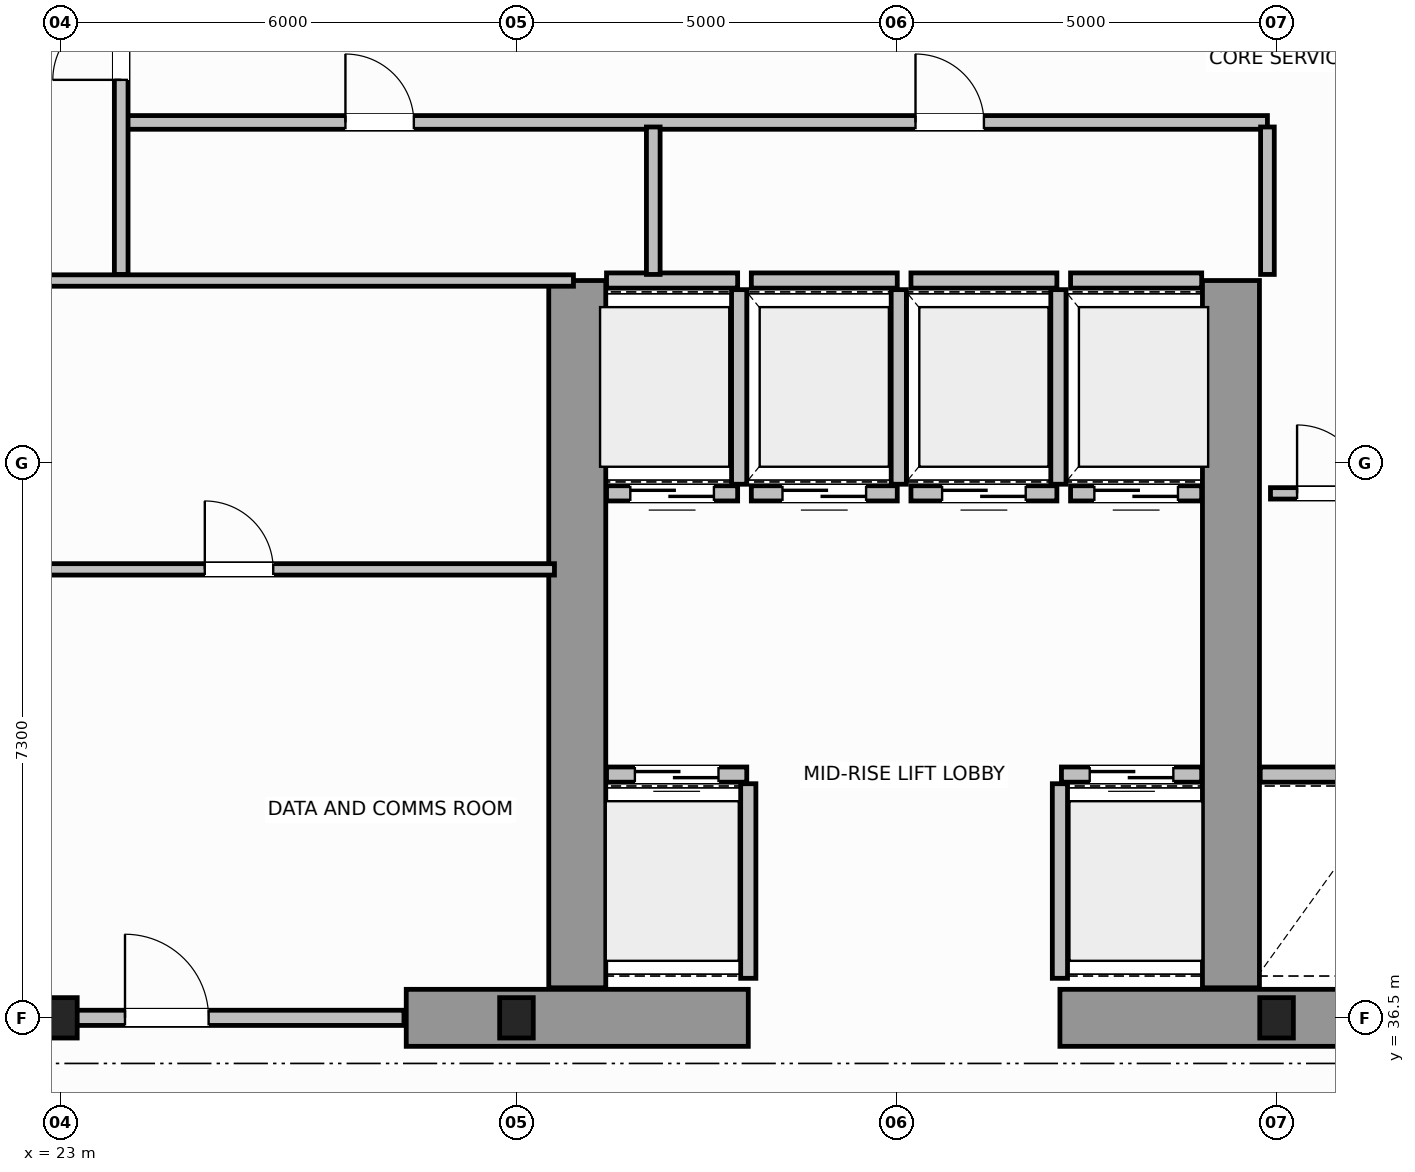
"""IFC4 building model, lengths in metres.
Left out: names, types, materials, properties, quantities, classifications, styles, units other than length and angle.
Written with IfcOpenShell. Run it as: python <this file> out.ifc"""

import sys

from ifc_helpers import new_model, si_unit, direction, frame, frame_2d, origin, origin_2d, place, context, subcontext, project, spatial, rectangle, i_section, extrude, source, transform, mapped, element, fill, save


model = new_model("IFC4")
c1 = context("Model", 3, precision=1e-05, world=origin(), true_north=direction((0.0, 1.0)))
c2 = subcontext(c1, "Body", "Model", "MODEL_VIEW")
j1 = project(units=[si_unit("LENGTHUNIT", "METRE"), si_unit("PLANEANGLEUNIT", "RADIAN")], contexts=[c1])
p1 = place(None, origin())
s1 = spatial("IfcSite", under=j1, at=p1, CompositionType="ELEMENT")
p2 = place(p1, origin())
s2 = spatial("IfcBuilding", under=s1, at=p2, CompositionType="ELEMENT")
p3 = place(p2, frame((0.0, 0.0, 107.2)))
s3 = spatial("IfcBuildingStorey", under=s2, at=p3, CompositionType="ELEMENT", Elevation=107.2)
m1 = source(origin(), c2, "Body", "SweptSolid", [
    extrude(i_section(OverallWidth=0.442, OverallDepth=0.531, WebThickness=0.065, FlangeThickness=0.076, FilletRadius=0.015, at=origin_2d()), origin(), (0.0, 0.0, 1.0), 3.8),
])
for number, where, z_axis, x_axis in (
    (1, (23.0, 36.5, 0.0), (0.0, 0.0, 1.0), (1.0, 0.0, 0.0)),
    (2, (29.0, 36.5, 0.0), (0.0, 0.0, 1.0), (1.0, 0.0, 0.0)),
    (3, (39.0, 36.5, 0.0), (0.0, 0.0, 1.0), (1.0, 0.0, 0.0)),
):
    element("IfcColumn", number, at=place(p3, frame(where, z_axis=z_axis, x_axis=x_axis)), inside=s3, PredefinedType="COLUMN", context=c2, shape_type="MappedRepresentation", body=[
        mapped(m1, transform((0.0, 0.0, 0.0), scale=1.0)),
    ])
for number, where, z_axis, x_axis in (
    (4, (27.55, 36.5, 0.0), (0.0, 0.0, 1.0), (1.0, 0.0, 0.0)),
    (5, (36.15, 36.5, 0.0), (0.0, 0.0, 1.0), (1.0, 0.0, 0.0)),
):
    element("IfcWall", number, at=place(p3, frame(where, z_axis=z_axis, x_axis=x_axis)), inside=s3, PredefinedType="SHEAR", context=c2, shape_type="SweptSolid", body=[
        extrude(rectangle(XDim=4.5, YDim=0.75, at=frame_2d((2.25, 0.0))), origin(), (0.0, 0.0, 1.0), 3.8),
    ])
for number, where, z_axis, x_axis in (
    (6, (29.8, 36.895, 0.0), (0.0, 0.0, 1.0), (0.0, 1.0, 0.0)),
    (7, (38.4, 36.895, 0.0), (0.0, 0.0, 1.0), (0.0, 1.0, 0.0)),
):
    element("IfcWall", number, at=place(p3, frame(where, z_axis=z_axis, x_axis=x_axis)), inside=s3, PredefinedType="SHEAR", context=c2, shape_type="SweptSolid", body=[
        extrude(rectangle(XDim=9.305, YDim=0.75, at=frame_2d((4.652, 0.0))), origin(), (0.0, 0.0, 1.0), 3.8),
    ])
p4 = place(p3, frame((30.185, 39.7, 0.0), z_axis=(0.0, 0.0, 1.0), x_axis=(1.0, 0.0, 0.0)))
e8 = element("IfcWall", 8, at=p4, inside=s3, PredefinedType="SOLIDWALL", context=c2, shape_type="SweptSolid", body=[
    extrude(rectangle(XDim=1.845, YDim=0.2, at=frame_2d((0.922, 0.0))), origin(), (0.0, 0.0, 1.0), 3.58),
])
p5 = place(p4, frame((0.373, 0.0, 0.0)))
e9 = element("IfcOpeningElement", 9, at=p5, cuts=e8, PredefinedType="OPENING", context=c2, shape_type="SweptSolid", body=[
    extrude(rectangle(XDim=1.1, YDim=2.15, at=frame_2d((0.55, 1.075))), frame((0.0, 0.11, 0.0), z_axis=(0.0, -1.0, 0.0), x_axis=(1.0, 0.0, 0.0)), (0.0, 0.0, 1.0), 0.22),
])
p6 = place(p3, frame((32.05, 37.02, 0.0), z_axis=(0.0, 0.0, 1.0), x_axis=(0.0, 1.0, 0.0)))
e10 = element("IfcWall", 10, at=p6, inside=s3, PredefinedType="SOLIDWALL", context=c2, shape_type="SweptSolid", body=[
    extrude(rectangle(XDim=2.56, YDim=0.2, at=frame_2d((1.28, 0.0))), origin(), (0.0, 0.0, 1.0), 3.58),
])
p7 = place(p3, frame((36.17, 39.7, 0.0), z_axis=(0.0, 0.0, 1.0), x_axis=(1.0, 0.0, 0.0)))
e11 = element("IfcWall", 11, at=p7, inside=s3, PredefinedType="SOLIDWALL", context=c2, shape_type="SweptSolid", body=[
    extrude(rectangle(XDim=1.845, YDim=0.2, at=frame_2d((0.922, 0.0))), origin(), (0.0, 0.0, 1.0), 3.58),
])
p8 = place(p7, frame((0.372, 0.0, 0.0)))
e12 = element("IfcOpeningElement", 12, at=p8, cuts=e11, PredefinedType="OPENING", context=c2, shape_type="SweptSolid", body=[
    extrude(rectangle(XDim=1.1, YDim=2.15, at=frame_2d((0.55, 1.075))), frame((0.0, 0.11, 0.0), z_axis=(0.0, -1.0, 0.0), x_axis=(1.0, 0.0, 0.0)), (0.0, 0.0, 1.0), 0.22),
])
p9 = place(p3, frame((36.15, 37.02, 0.0), z_axis=(0.0, 0.0, 1.0), x_axis=(0.0, 1.0, 0.0)))
e13 = element("IfcWall", 13, at=p9, inside=s3, PredefinedType="SOLIDWALL", context=c2, shape_type="SweptSolid", body=[
    extrude(rectangle(XDim=2.56, YDim=0.2, at=frame_2d((1.28, 0.0))), origin(), (0.0, 0.0, 1.0), 3.58),
])
p10 = place(p3, frame((30.185, 43.4, 0.0), z_axis=(0.0, 0.0, 1.0), x_axis=(1.0, 0.0, 0.0)))
e14 = element("IfcWall", 14, at=p10, inside=s3, PredefinedType="SOLIDWALL", context=c2, shape_type="SweptSolid", body=[
    extrude(rectangle(XDim=1.725, YDim=0.2, at=frame_2d((0.862, 0.0))), origin(), (0.0, 0.0, 1.0), 3.58),
])
p11 = place(p10, frame((0.313, 0.0, 0.0)))
e15 = element("IfcOpeningElement", 15, at=p11, cuts=e14, PredefinedType="OPENING", context=c2, shape_type="SweptSolid", body=[
    extrude(rectangle(XDim=1.1, YDim=2.15, at=frame_2d((0.55, 1.075))), frame((0.0, 0.11, 0.0), z_axis=(0.0, -1.0, 0.0), x_axis=(1.0, 0.0, 0.0)), (0.0, 0.0, 1.0), 0.22),
])
p12 = place(p3, frame((30.185, 46.2, 0.0), z_axis=(0.0, 0.0, 1.0), x_axis=(1.0, 0.0, 0.0)))
e16 = element("IfcWall", 16, at=p12, inside=s3, PredefinedType="SOLIDWALL", context=c2, shape_type="SweptSolid", body=[
    extrude(rectangle(XDim=1.725, YDim=0.2, at=frame_2d((0.862, 0.0))), origin(), (0.0, 0.0, 1.0), 3.58),
])
p13 = place(p3, frame((31.93, 43.52, 0.0), z_axis=(0.0, 0.0, 1.0), x_axis=(0.0, 1.0, 0.0)))
e17 = element("IfcWall", 17, at=p13, inside=s3, PredefinedType="SOLIDWALL", context=c2, shape_type="SweptSolid", body=[
    extrude(rectangle(XDim=2.56, YDim=0.2, at=frame_2d((1.28, 0.0))), origin(), (0.0, 0.0, 1.0), 3.58),
])
p14 = place(p3, frame((32.09, 43.4, 0.0), z_axis=(0.0, 0.0, 1.0), x_axis=(1.0, 0.0, 0.0)))
e18 = element("IfcWall", 18, at=p14, inside=s3, PredefinedType="SOLIDWALL", context=c2, shape_type="SweptSolid", body=[
    extrude(rectangle(XDim=1.92, YDim=0.2, at=frame_2d((0.96, 0.0))), origin(), (0.0, 0.0, 1.0), 3.58),
])
p15 = place(p14, frame((0.41, 0.0, 0.0)))
e19 = element("IfcOpeningElement", 19, at=p15, cuts=e18, PredefinedType="OPENING", context=c2, shape_type="SweptSolid", body=[
    extrude(rectangle(XDim=1.1, YDim=2.15, at=frame_2d((0.55, 1.075))), frame((0.0, 0.11, 0.0), z_axis=(0.0, -1.0, 0.0), x_axis=(1.0, 0.0, 0.0)), (0.0, 0.0, 1.0), 0.22),
])
p16 = place(p3, frame((32.09, 46.2, 0.0), z_axis=(0.0, 0.0, 1.0), x_axis=(1.0, 0.0, 0.0)))
e20 = element("IfcWall", 20, at=p16, inside=s3, PredefinedType="SOLIDWALL", context=c2, shape_type="SweptSolid", body=[
    extrude(rectangle(XDim=1.92, YDim=0.2, at=frame_2d((0.96, 0.0))), origin(), (0.0, 0.0, 1.0), 3.58),
])
p17 = place(p3, frame((34.03, 43.52, 0.0), z_axis=(0.0, 0.0, 1.0), x_axis=(0.0, 1.0, 0.0)))
e21 = element("IfcWall", 21, at=p17, inside=s3, PredefinedType="SOLIDWALL", context=c2, shape_type="SweptSolid", body=[
    extrude(rectangle(XDim=2.56, YDim=0.2, at=frame_2d((1.28, 0.0))), origin(), (0.0, 0.0, 1.0), 3.58),
])
p18 = place(p3, frame((34.19, 43.4, 0.0), z_axis=(0.0, 0.0, 1.0), x_axis=(1.0, 0.0, 0.0)))
e22 = element("IfcWall", 22, at=p18, inside=s3, PredefinedType="SOLIDWALL", context=c2, shape_type="SweptSolid", body=[
    extrude(rectangle(XDim=1.92, YDim=0.2, at=frame_2d((0.96, 0.0))), origin(), (0.0, 0.0, 1.0), 3.58),
])
p19 = place(p18, frame((0.41, 0.0, 0.0)))
e23 = element("IfcOpeningElement", 23, at=p19, cuts=e22, PredefinedType="OPENING", context=c2, shape_type="SweptSolid", body=[
    extrude(rectangle(XDim=1.1, YDim=2.15, at=frame_2d((0.55, 1.075))), frame((0.0, 0.11, 0.0), z_axis=(0.0, -1.0, 0.0), x_axis=(1.0, 0.0, 0.0)), (0.0, 0.0, 1.0), 0.22),
])
p20 = place(p3, frame((34.19, 46.2, 0.0), z_axis=(0.0, 0.0, 1.0), x_axis=(1.0, 0.0, 0.0)))
e24 = element("IfcWall", 24, at=p20, inside=s3, PredefinedType="SOLIDWALL", context=c2, shape_type="SweptSolid", body=[
    extrude(rectangle(XDim=1.92, YDim=0.2, at=frame_2d((0.96, 0.0))), origin(), (0.0, 0.0, 1.0), 3.58),
])
p21 = place(p3, frame((36.13, 43.52, 0.0), z_axis=(0.0, 0.0, 1.0), x_axis=(0.0, 1.0, 0.0)))
e25 = element("IfcWall", 25, at=p21, inside=s3, PredefinedType="SOLIDWALL", context=c2, shape_type="SweptSolid", body=[
    extrude(rectangle(XDim=2.56, YDim=0.2, at=frame_2d((1.28, 0.0))), origin(), (0.0, 0.0, 1.0), 3.58),
])
p22 = place(p3, frame((36.29, 43.4, 0.0), z_axis=(0.0, 0.0, 1.0), x_axis=(1.0, 0.0, 0.0)))
e26 = element("IfcWall", 26, at=p22, inside=s3, PredefinedType="SOLIDWALL", context=c2, shape_type="SweptSolid", body=[
    extrude(rectangle(XDim=1.725, YDim=0.2, at=frame_2d((0.862, 0.0))), origin(), (0.0, 0.0, 1.0), 3.58),
])
p23 = place(p22, frame((0.313, 0.0, 0.0)))
e27 = element("IfcOpeningElement", 27, at=p23, cuts=e26, PredefinedType="OPENING", context=c2, shape_type="SweptSolid", body=[
    extrude(rectangle(XDim=1.1, YDim=2.15, at=frame_2d((0.55, 1.075))), frame((0.0, 0.11, 0.0), z_axis=(0.0, -1.0, 0.0), x_axis=(1.0, 0.0, 0.0)), (0.0, 0.0, 1.0), 0.22),
])
p24 = place(p3, frame((36.29, 46.2, 0.0), z_axis=(0.0, 0.0, 1.0), x_axis=(1.0, 0.0, 0.0)))
e28 = element("IfcWall", 28, at=p24, inside=s3, PredefinedType="SOLIDWALL", context=c2, shape_type="SweptSolid", body=[
    extrude(rectangle(XDim=1.725, YDim=0.2, at=frame_2d((0.862, 0.0))), origin(), (0.0, 0.0, 1.0), 3.58),
])
p25 = place(p3, frame((38.785, 39.7, 0.0), z_axis=(0.0, 0.0, 1.0), x_axis=(1.0, 0.0, 0.0)))
e29 = element("IfcWall", 29, at=p25, inside=s3, PredefinedType="SOLIDWALL", context=c2, shape_type="SweptSolid", body=[
    extrude(rectangle(XDim=1.845, YDim=0.2, at=frame_2d((0.922, 0.0))), origin(), (0.0, 0.0, 1.0), 3.58),
])
p26 = place(p3, frame((21.25, 36.5, 0.0), z_axis=(0.0, 0.0, 1.0), x_axis=(1.0, 0.0, 0.0)))
e30 = element("IfcWall", 30, at=p26, inside=s3, PredefinedType="SOLIDWALL", context=c2, shape_type="SweptSolid", body=[
    extrude(rectangle(XDim=6.27, YDim=0.2, at=frame_2d((3.135, 0.0))), origin(), (0.0, 0.0, 1.0), 2.37),
])
p27 = place(p26, frame((2.6, 0.0, 0.0)))
e31 = element("IfcOpeningElement", 31, at=p27, cuts=e30, PredefinedType="OPENING", context=c2, shape_type="SweptSolid", body=[
    extrude(rectangle(XDim=1.1, YDim=2.15, at=frame_2d((0.55, 1.075))), frame((0.0, 0.11, 0.0), z_axis=(0.0, -1.0, 0.0), x_axis=(1.0, 0.0, 0.0)), (0.0, 0.0, 1.0), 0.22),
])
p28 = place(p3, frame((21.25, 46.2, 0.0), z_axis=(0.0, 0.0, 1.0), x_axis=(1.0, 0.0, 0.0)))
e32 = element("IfcWall", 32, at=p28, inside=s3, PredefinedType="PARTITIONING", context=c2, shape_type="SweptSolid", body=[
    extrude(rectangle(XDim=8.5, YDim=0.15, at=frame_2d((4.25, 0.0))), origin(), (0.0, 0.0, 1.0), 3.58),
])
p29 = place(p3, frame((21.5, 42.4, 0.0), z_axis=(0.0, 0.0, 1.0), x_axis=(1.0, 0.0, 0.0)))
e33 = element("IfcWall", 33, at=p29, inside=s3, PredefinedType="PARTITIONING", context=c2, shape_type="SweptSolid", body=[
    extrude(rectangle(XDim=8.0, YDim=0.15, at=frame_2d((4.0, 0.0))), origin(), (0.0, 0.0, 1.0), 3.58),
])
p30 = place(p29, frame((3.4, 0.0, 0.0)))
e34 = element("IfcOpeningElement", 34, at=p30, cuts=e33, PredefinedType="OPENING", context=c2, shape_type="SweptSolid", body=[
    extrude(rectangle(XDim=0.9, YDim=2.1, at=frame_2d((0.45, 1.05))), frame((0.0, 0.085, 0.0), z_axis=(0.0, -1.0, 0.0), x_axis=(1.0, 0.0, 0.0)), (0.0, 0.0, 1.0), 0.17),
])
p31 = place(p3, frame((38.92, 43.4, 0.0), z_axis=(0.0, 0.0, 1.0), x_axis=(1.0, 0.0, 0.0)))
e35 = element("IfcWall", 35, at=p31, inside=s3, PredefinedType="PARTITIONING", context=c2, shape_type="SweptSolid", body=[
    extrude(rectangle(XDim=1.6, YDim=0.15, at=frame_2d((0.8, 0.0))), origin(), (0.0, 0.0, 1.0), 3.58),
])
p32 = place(p31, frame((0.35, 0.0, 0.0)))
e36 = element("IfcOpeningElement", 36, at=p32, cuts=e35, PredefinedType="OPENING", context=c2, shape_type="SweptSolid", body=[
    extrude(rectangle(XDim=0.9, YDim=2.1, at=frame_2d((0.45, 1.05))), frame((0.0, 0.085, 0.0), z_axis=(0.0, -1.0, 0.0), x_axis=(1.0, 0.0, 0.0)), (0.0, 0.0, 1.0), 0.17),
])
p33 = place(p3, frame((23.85, 48.28, 0.0), z_axis=(0.0, 0.0, 1.0), x_axis=(1.0, 0.0, 0.0)))
e37 = element("IfcWall", 37, at=p33, inside=s3, PredefinedType="PLUMBINGWALL", context=c2, shape_type="SweptSolid", body=[
    extrude(rectangle(XDim=15.03, YDim=0.18, at=frame_2d((7.515, 0.0))), origin(), (0.0, 0.0, 1.0), 3.58),
])
p34 = place(p33, frame((2.9, 0.0, 0.0)))
e38 = element("IfcOpeningElement", 38, at=p34, cuts=e37, PredefinedType="OPENING", context=c2, shape_type="SweptSolid", body=[
    extrude(rectangle(XDim=0.9, YDim=2.15, at=frame_2d((0.45, 1.075))), frame((0.0, 0.1, 0.0), z_axis=(0.0, -1.0, 0.0), x_axis=(1.0, 0.0, 0.0)), (0.0, 0.0, 1.0), 0.2),
])
p35 = place(p33, frame((10.4, 0.0, 0.0)))
e39 = element("IfcOpeningElement", 39, at=p35, cuts=e37, PredefinedType="OPENING", context=c2, shape_type="SweptSolid", body=[
    extrude(rectangle(XDim=0.9, YDim=2.15, at=frame_2d((0.45, 1.075))), frame((0.0, 0.1, 0.0), z_axis=(0.0, -1.0, 0.0), x_axis=(1.0, 0.0, 0.0)), (0.0, 0.0, 1.0), 0.2),
])
p36 = place(p3, frame((23.8, 46.28, 0.0), z_axis=(0.0, 0.0, 1.0), x_axis=(0.0, 1.0, 0.0)))
e40 = element("IfcWall", 40, at=p36, inside=s3, PredefinedType="PLUMBINGWALL", context=c2, shape_type="SweptSolid", body=[
    extrude(rectangle(XDim=3.95, YDim=0.18, at=frame_2d((1.975, 0.0))), origin(), (0.0, 0.0, 1.0), 3.58),
])
p37 = place(p36, frame((2.56, 0.0, 0.0)))
e41 = element("IfcOpeningElement", 41, at=p37, cuts=e40, PredefinedType="OPENING", context=c2, shape_type="SweptSolid", body=[
    extrude(rectangle(XDim=0.9, YDim=2.15, at=frame_2d((0.45, 1.075))), frame((0.0, 0.1, 0.0), z_axis=(0.0, -1.0, 0.0), x_axis=(1.0, 0.0, 0.0)), (0.0, 0.0, 1.0), 0.2),
])
for number, where, z_axis, x_axis in (
    (42, (30.8, 46.28, 0.0), (0.0, 0.0, 1.0), (0.0, 1.0, 0.0)),
    (43, (38.88, 46.28, 0.0), (0.0, 0.0, 1.0), (0.0, 1.0, 0.0)),
):
    element("IfcWall", number, at=place(p3, frame(where, z_axis=z_axis, x_axis=x_axis)), inside=s3, PredefinedType="PLUMBINGWALL", context=c2, shape_type="SweptSolid", body=[
        extrude(rectangle(XDim=1.94, YDim=0.18, at=frame_2d((0.97, 0.0))), origin(), (0.0, 0.0, 1.0), 3.58),
    ])
m2 = source(origin(), c2, "Body", "SweptSolid", [
    extrude(rectangle(XDim=1.1, YDim=2.15, at=frame_2d((0.55, 1.075))), frame((0.0, 0.025, 0.0), z_axis=(0.0, -1.0, 0.0), x_axis=(1.0, 0.0, 0.0)), (0.0, 0.0, 1.0), 0.05),
])
p38 = place(p5, origin())
e44 = element("IfcDoor", 44, at=p38, inside=s3, OperationType="DOUBLE_DOOR_SLIDING", PredefinedType="DOOR", context=c2, shape_type="MappedRepresentation", body=[
    mapped(m2, transform((0.0, 0.0, 0.0), scale=1.0)),
])
fill(e9, e44)
p39 = place(p8, origin())
e45 = element("IfcDoor", 45, at=p39, inside=s3, OperationType="DOUBLE_DOOR_SLIDING", PredefinedType="DOOR", context=c2, shape_type="MappedRepresentation", body=[
    mapped(m2, transform((0.0, 0.0, 0.0), scale=1.0)),
])
fill(e12, e45)
p40 = place(p11, origin())
e46 = element("IfcDoor", 46, at=p40, inside=s3, OperationType="DOUBLE_DOOR_SLIDING", PredefinedType="DOOR", context=c2, shape_type="MappedRepresentation", body=[
    mapped(m2, transform((0.0, 0.0, 0.0), scale=1.0)),
])
fill(e15, e46)
p41 = place(p15, origin())
e47 = element("IfcDoor", 47, at=p41, inside=s3, OperationType="DOUBLE_DOOR_SLIDING", PredefinedType="DOOR", context=c2, shape_type="MappedRepresentation", body=[
    mapped(m2, transform((0.0, 0.0, 0.0), scale=1.0)),
])
fill(e19, e47)
p42 = place(p19, origin())
e48 = element("IfcDoor", 48, at=p42, inside=s3, OperationType="DOUBLE_DOOR_SLIDING", PredefinedType="DOOR", context=c2, shape_type="MappedRepresentation", body=[
    mapped(m2, transform((0.0, 0.0, 0.0), scale=1.0)),
])
fill(e23, e48)
p43 = place(p23, origin())
e49 = element("IfcDoor", 49, at=p43, inside=s3, OperationType="DOUBLE_DOOR_SLIDING", PredefinedType="DOOR", context=c2, shape_type="MappedRepresentation", body=[
    mapped(m2, transform((0.0, 0.0, 0.0), scale=1.0)),
])
fill(e27, e49)
p44 = place(p27, origin())
e50 = element("IfcDoor", 50, at=p44, inside=s3, OperationType="SINGLE_SWING_LEFT", PredefinedType="DOOR", context=c2, shape_type="MappedRepresentation", body=[
    mapped(m2, transform((0.0, 0.0, 0.0), scale=1.0)),
])
fill(e31, e50)
m3 = source(origin(), c2, "Body", "SweptSolid", [
    extrude(rectangle(XDim=0.9, YDim=2.1, at=frame_2d((0.45, 1.05))), frame((0.0, 0.025, 0.0), z_axis=(0.0, -1.0, 0.0), x_axis=(1.0, 0.0, 0.0)), (0.0, 0.0, 1.0), 0.05),
])
p45 = place(p30, origin())
e51 = element("IfcDoor", 51, at=p45, inside=s3, OperationType="SINGLE_SWING_RIGHT", PredefinedType="DOOR", context=c2, shape_type="MappedRepresentation", body=[
    mapped(m3, transform((0.0, 0.0, 0.0), scale=1.0)),
])
fill(e34, e51)
p46 = place(p32, origin())
e52 = element("IfcDoor", 52, at=p46, inside=s3, OperationType="SINGLE_SWING_LEFT", PredefinedType="DOOR", context=c2, shape_type="MappedRepresentation", body=[
    mapped(m3, transform((0.0, 0.0, 0.0), scale=1.0)),
])
fill(e36, e52)
m4 = source(origin(), c2, "Body", "SweptSolid", [
    extrude(rectangle(XDim=0.9, YDim=2.15, at=frame_2d((0.45, 1.075))), frame((0.0, 0.025, 0.0), z_axis=(0.0, -1.0, 0.0), x_axis=(1.0, 0.0, 0.0)), (0.0, 0.0, 1.0), 0.05),
])
p47 = place(p37, origin())
e53 = element("IfcDoor", 53, at=p47, inside=s3, OperationType="SINGLE_SWING_LEFT", PredefinedType="DOOR", context=c2, shape_type="MappedRepresentation", body=[
    mapped(m4, transform((0.0, 0.0, 0.0), scale=1.0)),
])
fill(e41, e53)
p48 = place(p34, origin())
e54 = element("IfcDoor", 54, at=p48, inside=s3, OperationType="SINGLE_SWING_RIGHT", PredefinedType="DOOR", context=c2, shape_type="MappedRepresentation", body=[
    mapped(m4, transform((0.0, 0.0, 0.0), scale=1.0)),
])
fill(e38, e54)
p49 = place(p35, origin())
e55 = element("IfcDoor", 55, at=p49, inside=s3, OperationType="SINGLE_SWING_LEFT", PredefinedType="DOOR", context=c2, shape_type="MappedRepresentation", body=[
    mapped(m4, transform((0.0, 0.0, 0.0), scale=1.0)),
])
fill(e39, e55)
save(model, sys.argv[1])
